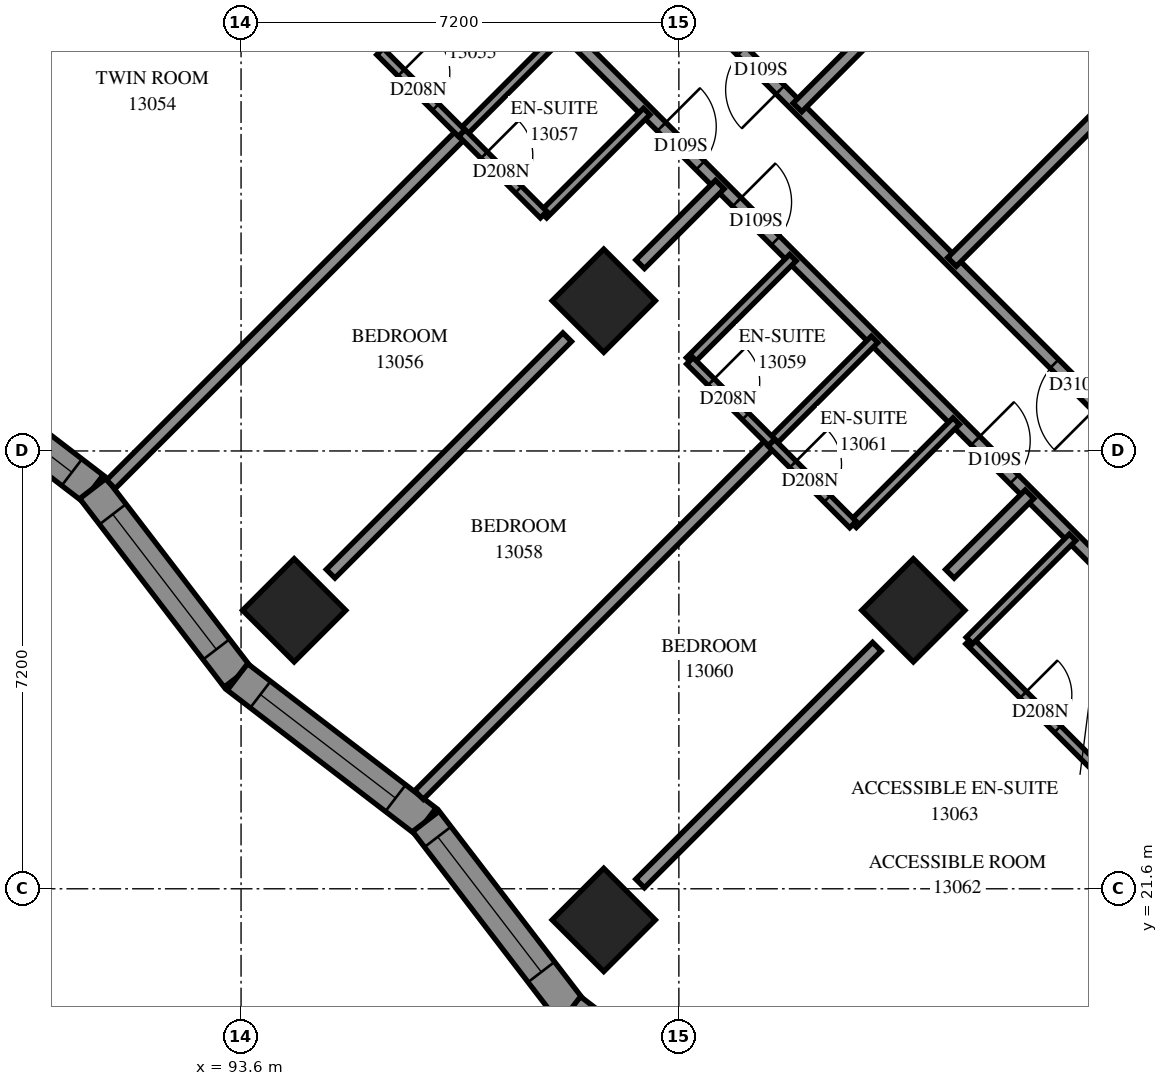
"""IFC4 building model, lengths in metres.
Left out: names, types, materials, properties, quantities, classifications, styles, units other than length and angle.
Written with IfcOpenShell. Run it as: python <this file> out.ifc"""

import sys

from ifc_helpers import new_model, si_unit, direction, frame, frame_2d, origin, origin_2d, place, context, subcontext, project, spatial, polyline, rectangle, outline, extrude, element, fill, save


model = new_model("IFC4")
c1 = context("Model", 3, precision=1e-05, world=origin(), true_north=direction((0.0, 1.0)))
c2 = subcontext(c1, "Body", "Model", "MODEL_VIEW")
j1 = project(units=[si_unit("LENGTHUNIT", "METRE"), si_unit("PLANEANGLEUNIT", "RADIAN")], contexts=[c1])
p1 = place(None, origin())
s1 = spatial("IfcSite", under=j1, at=p1, CompositionType="ELEMENT")
p2 = place(p1, origin())
s2 = spatial("IfcBuilding", under=s1, at=p2, CompositionType="ELEMENT")
p3 = place(p2, frame((0.0, 0.0, 50.8)))
s3 = spatial("IfcBuildingStorey", under=s2, at=p3, CompositionType="ELEMENT", Elevation=50.8)
for number, where, z_axis, x_axis in (
    (1, (99.565, 31.271, 0.0), (0.0, 0.0, 1.0), (0.707, -0.707, 0.0)),
    (2, (94.474, 26.18, 0.0), (0.0, 0.0, 1.0), (0.707, -0.707, 0.0)),
    (3, (104.656, 26.18, 0.0), (0.0, 0.0, 1.0), (0.707, -0.707, 0.0)),
    (4, (99.565, 21.088, 0.0), (0.0, 0.0, 1.0), (0.707, -0.707, 0.0)),
):
    element("IfcColumn", number, at=place(p3, frame(where, z_axis=z_axis, x_axis=x_axis)), inside=s3, PredefinedType="COLUMN", context=c2, shape_type="SweptSolid", body=[
        extrude(rectangle(XDim=1.2, YDim=1.2, at=origin_2d()), origin(), (0.0, 0.0, 1.0), 3.1),
    ])
p4 = place(p3, frame((88.065, 30.559, 0.0), z_axis=(0.0, 0.0, 1.0), x_axis=(0.7937184601, -0.6082852999, 0.0)))
e5 = element("IfcWall", 5, at=p4, inside=s3, PredefinedType="SOLIDWALL", context=c2, shape_type="SweptSolid", body=[
    extrude(outline(polyline([(-0.036, -0.275), (3.869, -0.275), (3.941, 0.275), (0.036, 0.275), (-0.036, -0.275)])), origin(), (0.0, 0.0, 1.0), 3.1),
])
p5 = place(p4, frame((0.668, 0.0, 0.5)))
e6 = element("IfcOpeningElement", 6, at=p5, cuts=e5, PredefinedType="OPENING", context=c2, shape_type="SweptSolid", body=[
    extrude(rectangle(XDim=2.8, YDim=2.45, at=frame_2d((1.4, 1.225))), frame((0.0, 0.285, 0.0), z_axis=(0.0, -1.0, 0.0), x_axis=(1.0, 0.0, 0.0)), (0.0, 0.0, 1.0), 0.57),
])
p6 = place(p3, frame((91.165, 28.183, 0.0), z_axis=(0.0, 0.0, 1.0), x_axis=(0.6082890689, -0.7937155717, 0.0)))
e7 = element("IfcWall", 7, at=p6, inside=s3, PredefinedType="SOLIDWALL", context=c2, shape_type="SweptSolid", body=[
    extrude(outline(polyline([(0.036, -0.275), (3.941, -0.275), (3.869, 0.275), (-0.036, 0.275), (0.036, -0.275)])), origin(), (0.0, 0.0, 1.0), 3.1),
])
p7 = place(p6, frame((0.534, 0.0, 0.5)))
e8 = element("IfcOpeningElement", 8, at=p7, cuts=e7, PredefinedType="OPENING", context=c2, shape_type="SweptSolid", body=[
    extrude(rectangle(XDim=2.8, YDim=2.45, at=frame_2d((1.4, 1.225))), frame((0.0, 0.285, 0.0), z_axis=(0.0, -1.0, 0.0), x_axis=(1.0, 0.0, 0.0)), (0.0, 0.0, 1.0), 0.57),
])
p8 = place(p3, frame((93.54, 25.084, 0.0), z_axis=(0.0, 0.0, 1.0), x_axis=(0.7937155717, -0.6082890689, 0.0)))
e9 = element("IfcWall", 9, at=p8, inside=s3, PredefinedType="SOLIDWALL", context=c2, shape_type="SweptSolid", body=[
    extrude(outline(polyline([(-0.036, -0.275), (3.869, -0.275), (3.941, 0.275), (0.036, 0.275), (-0.036, -0.275)])), origin(), (0.0, 0.0, 1.0), 3.1),
])
p9 = place(p8, frame((0.476, 0.0, 0.5)))
e10 = element("IfcOpeningElement", 10, at=p9, cuts=e9, PredefinedType="OPENING", context=c2, shape_type="SweptSolid", body=[
    extrude(rectangle(XDim=2.8, YDim=2.45, at=frame_2d((1.4, 1.225))), frame((0.0, 0.285, 0.0), z_axis=(0.0, -1.0, 0.0), x_axis=(1.0, 0.0, 0.0)), (0.0, 0.0, 1.0), 0.57),
])
p10 = place(p3, frame((96.64, 22.709, 0.0), z_axis=(0.0, 0.0, 1.0), x_axis=(0.6083014327, -0.7937060961, 0.0)))
e11 = element("IfcWall", 11, at=p10, inside=s3, PredefinedType="SOLIDWALL", context=c2, shape_type="SweptSolid", body=[
    extrude(outline(polyline([(0.036, -0.275), (3.941, -0.275), (3.869, 0.275), (-0.036, 0.275), (0.036, -0.275)])), origin(), (0.0, 0.0, 1.0), 3.1),
])
p11 = place(p10, frame((0.321, 0.0, 0.5)))
e12 = element("IfcOpeningElement", 12, at=p11, cuts=e11, PredefinedType="OPENING", context=c2, shape_type="SweptSolid", body=[
    extrude(rectangle(XDim=2.8, YDim=2.45, at=frame_2d((1.4, 1.225))), frame((0.0, 0.285, 0.0), z_axis=(0.0, -1.0, 0.0), x_axis=(1.0, 0.0, 0.0)), (0.0, 0.0, 1.0), 0.57),
])
p12 = place(p3, frame((99.015, 19.609, 0.0), z_axis=(0.0, 0.0, 1.0), x_axis=(0.7937059715, -0.6083015953, 0.0)))
e13 = element("IfcWall", 13, at=p12, inside=s3, PredefinedType="SOLIDWALL", context=c2, shape_type="SweptSolid", body=[
    extrude(outline(polyline([(-0.036, -0.275), (3.869, -0.275), (3.983, 0.275), (0.036, 0.275), (-0.036, -0.275)])), origin(), (0.0, 0.0, 1.0), 3.1),
])
p13 = place(p12, frame((1.002, 0.0, 0.5)))
e14 = element("IfcOpeningElement", 14, at=p13, cuts=e13, PredefinedType="OPENING", context=c2, shape_type="SweptSolid", body=[
    extrude(rectangle(XDim=1.2, YDim=2.45, at=frame_2d((0.6, 1.225))), frame((0.0, 0.285, 0.0), z_axis=(0.0, -1.0, 0.0), x_axis=(1.0, 0.0, 0.0)), (0.0, 0.0, 1.0), 0.57),
])
p14 = place(p3, frame((93.481, 41.167, 0.0), z_axis=(0.0, 0.0, 1.0), x_axis=(0.7071067812, -0.7071067812, 0.0)))
e15 = element("IfcWall", 15, at=p14, inside=s3, PredefinedType="PARTITIONING", context=c2, shape_type="SweptSolid", body=[
    extrude(rectangle(XDim=25.699, YDim=0.2, at=frame_2d((12.85, 0.0))), origin(), (0.0, 0.0, 1.0), 3.1),
])
p15 = place(p14, frame((2.8, 0.0, 0.0)))
e16 = element("IfcOpeningElement", 16, at=p15, cuts=e15, PredefinedType="OPENING", context=c2, shape_type="SweptSolid", body=[
    extrude(rectangle(XDim=0.9, YDim=2.1, at=frame_2d((0.45, 1.05))), frame((0.0, 0.11, 0.0), z_axis=(0.0, -1.0, 0.0), x_axis=(1.0, 0.0, 0.0)), (0.0, 0.0, 1.0), 0.22),
])
p16 = place(p14, frame((9.948, 0.0, 0.0)))
e17 = element("IfcOpeningElement", 17, at=p16, cuts=e15, PredefinedType="OPENING", context=c2, shape_type="SweptSolid", body=[
    extrude(rectangle(XDim=0.9, YDim=2.1, at=frame_2d((0.45, 1.05))), frame((0.0, 0.11, 0.0), z_axis=(0.0, -1.0, 0.0), x_axis=(1.0, 0.0, 0.0)), (0.0, 0.0, 1.0), 0.22),
])
p17 = place(p14, frame((11.7, 0.0, 0.0)))
e18 = element("IfcOpeningElement", 18, at=p17, cuts=e15, PredefinedType="OPENING", context=c2, shape_type="SweptSolid", body=[
    extrude(rectangle(XDim=0.9, YDim=2.1, at=frame_2d((0.45, 1.05))), frame((0.0, 0.11, 0.0), z_axis=(0.0, -1.0, 0.0), x_axis=(1.0, 0.0, 0.0)), (0.0, 0.0, 1.0), 0.22),
])
p18 = place(p14, frame((17.25, 0.0, 0.0)))
e19 = element("IfcOpeningElement", 19, at=p18, cuts=e15, PredefinedType="OPENING", context=c2, shape_type="SweptSolid", body=[
    extrude(rectangle(XDim=0.9, YDim=2.1, at=frame_2d((0.45, 1.05))), frame((0.0, 0.11, 0.0), z_axis=(0.0, -1.0, 0.0), x_axis=(1.0, 0.0, 0.0)), (0.0, 0.0, 1.0), 0.22),
])
p19 = place(p14, frame((22.82, 0.0, 0.0)))
e20 = element("IfcOpeningElement", 20, at=p19, cuts=e15, PredefinedType="OPENING", context=c2, shape_type="SweptSolid", body=[
    extrude(rectangle(XDim=0.9, YDim=2.1, at=frame_2d((0.45, 1.05))), frame((0.0, 0.11, 0.0), z_axis=(0.0, -1.0, 0.0), x_axis=(1.0, 0.0, 0.0)), (0.0, 0.0, 1.0), 0.22),
])
p20 = place(p3, frame((111.352, 25.855, 0.0), z_axis=(0.0, 0.0, 1.0), x_axis=(-0.7070418597, 0.7071716967, 0.0)))
e21 = element("IfcWall", 21, at=p20, inside=s3, PredefinedType="PARTITIONING", context=c2, shape_type="SweptSolid", body=[
    extrude(rectangle(XDim=13.864, YDim=0.2, at=frame_2d((6.932, 0.0))), origin(), (0.0, 0.0, 1.0), 3.1),
])
p21 = place(p20, frame((12.564, 0.0, 0.0)))
e22 = element("IfcOpeningElement", 22, at=p21, cuts=e21, PredefinedType="OPENING", context=c2, shape_type="SweptSolid", body=[
    extrude(rectangle(XDim=0.9, YDim=2.1, at=frame_2d((0.45, 1.05))), frame((0.0, 0.11, 0.0), z_axis=(0.0, -1.0, 0.0), x_axis=(1.0, 0.0, 0.0)), (0.0, 0.0, 1.0), 0.22),
])
p22 = place(p20, frame((5.19, 0.0, 0.0)))
e23 = element("IfcOpeningElement", 23, at=p22, cuts=e21, PredefinedType="OPENING", context=c2, shape_type="SweptSolid", body=[
    extrude(rectangle(XDim=1.0, YDim=2.1, at=frame_2d((0.5, 1.05))), frame((0.0, 0.11, 0.0), z_axis=(0.0, -1.0, 0.0), x_axis=(1.0, 0.0, 0.0)), (0.0, 0.0, 1.0), 0.22),
])
p23 = place(p3, frame((105.292, 31.908, 0.0), z_axis=(0.0, 0.0, 1.0), x_axis=(0.7071022382, 0.7071113241, 0.0)))
e24 = element("IfcWall", 24, at=p23, inside=s3, PredefinedType="PARTITIONING", context=c2, shape_type="SweptSolid", body=[
    extrude(rectangle(XDim=11.006, YDim=0.2, at=frame_2d((5.503, 0.0))), origin(), (0.0, 0.0, 1.0), 3.1),
])
p24 = place(p3, frame((86.314, 33.295, 0.0), z_axis=(0.0, 0.0, 1.0), x_axis=(0.7071020809, 0.7071114814, 0.0)))
e25 = element("IfcWall", 25, at=p24, inside=s3, PredefinedType="PARTITIONING", context=c2, shape_type="SweptSolid", body=[
    extrude(rectangle(XDim=10.638, YDim=0.2, at=frame_2d((5.319, 0.0))), origin(), (0.0, 0.0, 1.0), 3.1),
])
p25 = place(p3, frame((86.836, 34.524, 0.0), z_axis=(0.0, 0.0, 1.0), x_axis=(0.7071067812, 0.7071067812, 0.0)))
e26 = element("IfcWall", 26, at=p25, inside=s3, PredefinedType="PARTITIONING", context=c2, shape_type="SweptSolid", body=[
    extrude(rectangle(XDim=9.399, YDim=0.2, at=frame_2d((4.699, 0.0))), origin(), (0.0, 0.0, 1.0), 3.1),
])
p26 = place(p3, frame((96.526, 23.142, 0.0), z_axis=(0.0, 0.0, 1.0), x_axis=(0.7071128801, 0.7071006822, 0.0)))
e27 = element("IfcWall", 27, at=p26, inside=s3, PredefinedType="PARTITIONING", context=c2, shape_type="SweptSolid", body=[
    extrude(rectangle(XDim=8.198, YDim=0.2, at=frame_2d((4.099, 0.0))), origin(), (0.0, 0.0, 1.0), 3.1),
])
p27 = place(p3, frame((91.459, 28.251, 0.0), z_axis=(0.0, 0.0, 1.0), x_axis=(0.7072230972, 0.706990446, 0.0)))
e28 = element("IfcWall", 28, at=p27, inside=s3, PredefinedType="PARTITIONING", context=c2, shape_type="SweptSolid", body=[
    extrude(rectangle(XDim=8.167, YDim=0.2, at=frame_2d((4.083, 0.0))), origin(), (0.0, 0.0, 1.0), 3.1),
])
p28 = place(p3, frame((100.162, 21.688, 0.0), z_axis=(0.0, 0.0, 1.0), x_axis=(0.7071067812, 0.7071067812, 0.0)))
e29 = element("IfcWall", 29, at=p28, inside=s3, PredefinedType="PARTITIONING", context=c2, shape_type="SweptSolid", body=[
    extrude(rectangle(XDim=5.507, YDim=0.2, at=frame_2d((2.753, 0.0))), origin(), (0.0, 0.0, 1.0), 3.1),
])
p29 = place(p3, frame((105.255, 16.599, 0.0), z_axis=(0.0, 0.0, 1.0), x_axis=(0.7071067812, 0.7071067812, 0.0)))
e30 = element("IfcWall", 30, at=p29, inside=s3, PredefinedType="PARTITIONING", context=c2, shape_type="SweptSolid", body=[
    extrude(rectangle(XDim=5.504, YDim=0.2, at=frame_2d((2.752, 0.0))), origin(), (0.0, 0.0, 1.0), 2.6),
])
p30 = place(p3, frame((95.073, 26.781, 0.0), z_axis=(0.0, 0.0, 1.0), x_axis=(0.7071067812, 0.7071067812, 0.0)))
e31 = element("IfcWall", 31, at=p30, inside=s3, PredefinedType="PARTITIONING", context=c2, shape_type="SweptSolid", body=[
    extrude(rectangle(XDim=5.501, YDim=0.2, at=frame_2d((2.751, 0.0))), origin(), (0.0, 0.0, 1.0), 3.1),
])
p31 = place(p3, frame((105.573, 25.681, 0.0), z_axis=(0.0, 0.0, 1.0), x_axis=(0.7071067812, -0.7071067812, 0.0)))
e32 = element("IfcWall", 32, at=p31, inside=s3, PredefinedType="PARTITIONING", context=c2, shape_type="SweptSolid", body=[
    extrude(rectangle(XDim=3.199, YDim=0.15, at=frame_2d((1.599, 0.0))), origin(), (0.0, 0.0, 1.0), 3.1),
])
p32 = place(p31, frame((1.258, 0.0, 0.0)))
e33 = element("IfcOpeningElement", 33, at=p32, cuts=e32, PredefinedType="OPENING", context=c2, shape_type="SweptSolid", body=[
    extrude(rectangle(XDim=0.8, YDim=2.1, at=frame_2d((0.4, 1.05))), frame((0.0, 0.085, 0.0), z_axis=(0.0, -1.0, 0.0), x_axis=(1.0, 0.0, 0.0)), (0.0, 0.0, 1.0), 0.17),
])
for number, where, z_axis, x_axis in (
    (34, (100.977, 30.281, 0.0), (0.0, 0.0, 1.0), (0.707, 0.707, 0.0)),
    (35, (98.573, 32.685, 0.0), (0.0, 0.0, 1.0), (0.707, 0.707, 0.0)),
):
    element("IfcWall", number, at=place(p3, frame(where, z_axis=z_axis, x_axis=x_axis)), inside=s3, PredefinedType="PARTITIONING", context=c2, shape_type="SweptSolid", body=[
        extrude(rectangle(XDim=2.401, YDim=0.15, at=frame_2d((1.201, 0.0))), origin(), (0.0, 0.0, 1.0), 3.1),
    ])
for number, where, z_axis, x_axis in (
    (36, (105.578, 25.682, 0.0), (0.0, 0.0, 1.0), (0.707, 0.708, 0.0)),
    (37, (97.234, 34.026, 0.0), (0.0, 0.0, 1.0), (0.707, 0.708, 0.0)),
):
    element("IfcWall", number, at=place(p3, frame(where, z_axis=z_axis, x_axis=x_axis)), inside=s3, PredefinedType="PARTITIONING", context=c2, shape_type="SweptSolid", body=[
        extrude(rectangle(XDim=2.4, YDim=0.15, at=frame_2d((1.2, 0.0))), origin(), (0.0, 0.0, 1.0), 3.1),
    ])
for number, where, z_axis, x_axis in (
    (38, (95.887, 35.373, 0.0), (0.0, 0.0, 1.0), (0.707, 0.707, 0.0)),
    (39, (102.323, 28.939, 0.0), (0.0, 0.0, 1.0), (0.707, 0.707, 0.0)),
    (40, (103.665, 27.595, 0.0), (0.0, 0.0, 1.0), (0.707, 0.707, 0.0)),
):
    element("IfcWall", number, at=place(p3, frame(where, z_axis=z_axis, x_axis=x_axis)), inside=s3, PredefinedType="PARTITIONING", context=c2, shape_type="SweptSolid", body=[
        extrude(rectangle(XDim=2.398, YDim=0.15, at=frame_2d((1.199, 0.0))), origin(), (0.0, 0.0, 1.0), 3.1),
    ])
p33 = place(p3, frame((95.885, 35.369, 0.0), z_axis=(0.0, 0.0, 1.0), x_axis=(0.7071067812, -0.7071067812, 0.0)))
e41 = element("IfcWall", 41, at=p33, inside=s3, PredefinedType="PARTITIONING", context=c2, shape_type="SweptSolid", body=[
    extrude(rectangle(XDim=1.901, YDim=0.15, at=frame_2d((0.95, 0.0))), origin(), (0.0, 0.0, 1.0), 3.1),
])
p34 = place(p33, frame((0.493, 0.0, 0.0)))
e42 = element("IfcOpeningElement", 42, at=p34, cuts=e41, PredefinedType="OPENING", context=c2, shape_type="SweptSolid", body=[
    extrude(rectangle(XDim=0.8, YDim=2.1, at=frame_2d((0.4, 1.05))), frame((0.0, 0.085, 0.0), z_axis=(0.0, -1.0, 0.0), x_axis=(1.0, 0.0, 0.0)), (0.0, 0.0, 1.0), 0.17),
])
p35 = place(p3, frame((100.981, 30.283, 0.0), z_axis=(0.0, 0.0, 1.0), x_axis=(0.7076330979, -0.7065800724, 0.0)))
e43 = element("IfcWall", 43, at=p35, inside=s3, PredefinedType="PARTITIONING", context=c2, shape_type="SweptSolid", body=[
    extrude(rectangle(XDim=1.899, YDim=0.15, at=frame_2d((0.95, 0.0))), origin(), (0.0, 0.0, 1.0), 3.1),
])
p36 = place(p35, frame((0.493, 0.0, 0.0)))
e44 = element("IfcOpeningElement", 44, at=p36, cuts=e43, PredefinedType="OPENING", context=c2, shape_type="SweptSolid", body=[
    extrude(rectangle(XDim=0.8, YDim=2.1, at=frame_2d((0.4, 1.05))), frame((0.0, 0.085, 0.0), z_axis=(0.0, -1.0, 0.0), x_axis=(1.0, 0.0, 0.0)), (0.0, 0.0, 1.0), 0.17),
])
p37 = place(p3, frame((97.233, 34.029, 0.0), z_axis=(0.0, 0.0, 1.0), x_axis=(0.7065800724, -0.7076330979, 0.0)))
e45 = element("IfcWall", 45, at=p37, inside=s3, PredefinedType="PARTITIONING", context=c2, shape_type="SweptSolid", body=[
    extrude(rectangle(XDim=1.899, YDim=0.15, at=frame_2d((0.95, 0.0))), origin(), (0.0, 0.0, 1.0), 3.1),
])
p38 = place(p37, frame((0.515, 0.0, 0.0)))
e46 = element("IfcOpeningElement", 46, at=p38, cuts=e45, PredefinedType="OPENING", context=c2, shape_type="SweptSolid", body=[
    extrude(rectangle(XDim=0.8, YDim=2.1, at=frame_2d((0.4, 1.05))), frame((0.0, 0.085, 0.0), z_axis=(0.0, -1.0, 0.0), x_axis=(1.0, 0.0, 0.0)), (0.0, 0.0, 1.0), 0.17),
])
p39 = place(p3, frame((102.321, 28.935, 0.0), z_axis=(0.0, 0.0, 1.0), x_axis=(0.7065800724, -0.7076330979, 0.0)))
e47 = element("IfcWall", 47, at=p39, inside=s3, PredefinedType="PARTITIONING", context=c2, shape_type="SweptSolid", body=[
    extrude(rectangle(XDim=1.899, YDim=0.15, at=frame_2d((0.95, 0.0))), origin(), (0.0, 0.0, 1.0), 3.1),
])
p40 = place(p39, frame((0.501, 0.0, 0.0)))
e48 = element("IfcOpeningElement", 48, at=p40, cuts=e47, PredefinedType="OPENING", context=c2, shape_type="SweptSolid", body=[
    extrude(rectangle(XDim=0.8, YDim=2.1, at=frame_2d((0.4, 1.05))), frame((0.0, 0.085, 0.0), z_axis=(0.0, -1.0, 0.0), x_axis=(1.0, 0.0, 0.0)), (0.0, 0.0, 1.0), 0.17),
])
p41 = place(p3, frame((100.163, 31.871, 0.0), z_axis=(0.0, 0.0, 1.0), x_axis=(0.7071067812, 0.7071067812, 0.0)))
e49 = element("IfcWall", 49, at=p41, inside=s3, PredefinedType="PARTITIONING", context=c2, shape_type="SweptSolid", body=[
    extrude(rectangle(XDim=1.853, YDim=0.2, at=frame_2d((0.926, 0.0))), origin(), (0.0, 0.0, 1.0), 3.1),
])
for number, where, z_axis, x_axis in (
    (50, (105.256, 26.78, 0.0), (0.0, 0.0, 1.0), (0.708, 0.707, 0.0)),
    (51, (102.75, 34.45, 0.0), (0.0, 0.0, 1.0), (0.707, 0.708, 0.0)),
):
    element("IfcWall", number, at=place(p3, frame(where, z_axis=z_axis, x_axis=x_axis)), inside=s3, PredefinedType="PARTITIONING", context=c2, shape_type="SweptSolid", body=[
        extrude(rectangle(XDim=1.851, YDim=0.2, at=frame_2d((0.926, 0.0))), origin(), (0.0, 0.0, 1.0), 3.1),
    ])
p42 = place(p5, origin())
e52 = element("IfcWindow", 52, at=p42, inside=s3, PartitioningType="SINGLE_PANEL", PredefinedType="WINDOW", context=c2, shape_type="SweptSolid", body=[
    extrude(rectangle(XDim=2.8, YDim=2.45, at=frame_2d((1.4, 1.225))), frame((0.0, 0.155, 0.0), z_axis=(0.0, -1.0, 0.0), x_axis=(1.0, 0.0, 0.0)), (0.0, 0.0, 1.0), 0.06),
])
fill(e6, e52)
p43 = place(p7, origin())
e53 = element("IfcWindow", 53, at=p43, inside=s3, PartitioningType="SINGLE_PANEL", PredefinedType="WINDOW", context=c2, shape_type="SweptSolid", body=[
    extrude(rectangle(XDim=2.8, YDim=2.45, at=frame_2d((1.4, 1.225))), frame((0.0, 0.155, 0.0), z_axis=(0.0, -1.0, 0.0), x_axis=(1.0, 0.0, 0.0)), (0.0, 0.0, 1.0), 0.06),
])
fill(e8, e53)
p44 = place(p9, origin())
e54 = element("IfcWindow", 54, at=p44, inside=s3, PartitioningType="SINGLE_PANEL", PredefinedType="WINDOW", context=c2, shape_type="SweptSolid", body=[
    extrude(rectangle(XDim=2.8, YDim=2.45, at=frame_2d((1.4, 1.225))), frame((0.0, 0.155, 0.0), z_axis=(0.0, -1.0, 0.0), x_axis=(1.0, 0.0, 0.0)), (0.0, 0.0, 1.0), 0.06),
])
fill(e10, e54)
p45 = place(p11, origin())
e55 = element("IfcWindow", 55, at=p45, inside=s3, PartitioningType="SINGLE_PANEL", PredefinedType="WINDOW", context=c2, shape_type="SweptSolid", body=[
    extrude(rectangle(XDim=2.8, YDim=2.45, at=frame_2d((1.4, 1.225))), frame((0.0, 0.155, 0.0), z_axis=(0.0, -1.0, 0.0), x_axis=(1.0, 0.0, 0.0)), (0.0, 0.0, 1.0), 0.06),
])
fill(e12, e55)
p46 = place(p21, origin())
e56 = element("IfcDoor", 56, at=p46, inside=s3, OperationType="SINGLE_SWING_RIGHT", PredefinedType="DOOR", context=c2, shape_type="SweptSolid", body=[
    extrude(rectangle(XDim=0.9, YDim=2.1, at=frame_2d((0.45, 1.05))), frame((0.0, 0.025, 0.0), z_axis=(0.0, -1.0, 0.0), x_axis=(1.0, 0.0, 0.0)), (0.0, 0.0, 1.0), 0.05),
])
fill(e22, e56)
p47 = place(p22, origin())
e57 = element("IfcDoor", 57, at=p47, inside=s3, OperationType="SINGLE_SWING_RIGHT", PredefinedType="DOOR", context=c2, shape_type="SweptSolid", body=[
    extrude(rectangle(XDim=1.0, YDim=2.1, at=frame_2d((0.5, 1.05))), frame((0.0, 0.025, 0.0), z_axis=(0.0, -1.0, 0.0), x_axis=(1.0, 0.0, 0.0)), (0.0, 0.0, 1.0), 0.05),
])
fill(e23, e57)
p48 = place(p34, origin())
e58 = element("IfcDoor", 58, at=p48, inside=s3, OperationType="SINGLE_SWING_RIGHT", PredefinedType="DOOR", context=c2, shape_type="SweptSolid", body=[
    extrude(rectangle(XDim=0.8, YDim=2.1, at=frame_2d((0.4, 1.05))), frame((0.0, 0.025, 0.0), z_axis=(0.0, -1.0, 0.0), x_axis=(1.0, 0.0, 0.0)), (0.0, 0.0, 1.0), 0.05),
])
fill(e42, e58)
p49 = place(p16, origin())
e59 = element("IfcDoor", 59, at=p49, inside=s3, OperationType="SINGLE_SWING_LEFT", PredefinedType="DOOR", context=c2, shape_type="SweptSolid", body=[
    extrude(rectangle(XDim=0.9, YDim=2.1, at=frame_2d((0.45, 1.05))), frame((0.0, 0.025, 0.0), z_axis=(0.0, -1.0, 0.0), x_axis=(1.0, 0.0, 0.0)), (0.0, 0.0, 1.0), 0.05),
])
fill(e17, e59)
p50 = place(p38, origin())
e60 = element("IfcDoor", 60, at=p50, inside=s3, OperationType="SINGLE_SWING_RIGHT", PredefinedType="DOOR", context=c2, shape_type="SweptSolid", body=[
    extrude(rectangle(XDim=0.8, YDim=2.1, at=frame_2d((0.4, 1.05))), frame((0.0, 0.025, 0.0), z_axis=(0.0, -1.0, 0.0), x_axis=(1.0, 0.0, 0.0)), (0.0, 0.0, 1.0), 0.05),
])
fill(e46, e60)
p51 = place(p17, origin())
e61 = element("IfcDoor", 61, at=p51, inside=s3, OperationType="SINGLE_SWING_RIGHT", PredefinedType="DOOR", context=c2, shape_type="SweptSolid", body=[
    extrude(rectangle(XDim=0.9, YDim=2.1, at=frame_2d((0.45, 1.05))), frame((0.0, 0.025, 0.0), z_axis=(0.0, -1.0, 0.0), x_axis=(1.0, 0.0, 0.0)), (0.0, 0.0, 1.0), 0.05),
])
fill(e18, e61)
p52 = place(p36, origin())
e62 = element("IfcDoor", 62, at=p52, inside=s3, OperationType="SINGLE_SWING_RIGHT", PredefinedType="DOOR", context=c2, shape_type="SweptSolid", body=[
    extrude(rectangle(XDim=0.8, YDim=2.1, at=frame_2d((0.4, 1.05))), frame((0.0, 0.025, 0.0), z_axis=(0.0, -1.0, 0.0), x_axis=(1.0, 0.0, 0.0)), (0.0, 0.0, 1.0), 0.05),
])
fill(e44, e62)
p53 = place(p18, origin())
e63 = element("IfcDoor", 63, at=p53, inside=s3, OperationType="SINGLE_SWING_LEFT", PredefinedType="DOOR", context=c2, shape_type="SweptSolid", body=[
    extrude(rectangle(XDim=0.9, YDim=2.1, at=frame_2d((0.45, 1.05))), frame((0.0, 0.025, 0.0), z_axis=(0.0, -1.0, 0.0), x_axis=(1.0, 0.0, 0.0)), (0.0, 0.0, 1.0), 0.05),
])
fill(e19, e63)
p54 = place(p40, origin())
e64 = element("IfcDoor", 64, at=p54, inside=s3, OperationType="SINGLE_SWING_RIGHT", PredefinedType="DOOR", context=c2, shape_type="SweptSolid", body=[
    extrude(rectangle(XDim=0.8, YDim=2.1, at=frame_2d((0.4, 1.05))), frame((0.0, 0.025, 0.0), z_axis=(0.0, -1.0, 0.0), x_axis=(1.0, 0.0, 0.0)), (0.0, 0.0, 1.0), 0.05),
])
fill(e48, e64)
p55 = place(p32, origin())
e65 = element("IfcDoor", 65, at=p55, inside=s3, OperationType="SINGLE_SWING_RIGHT", PredefinedType="DOOR", context=c2, shape_type="SweptSolid", body=[
    extrude(rectangle(XDim=0.8, YDim=2.1, at=frame_2d((0.4, 1.05))), frame((0.0, 0.025, 0.0), z_axis=(0.0, -1.0, 0.0), x_axis=(1.0, 0.0, 0.0)), (0.0, 0.0, 1.0), 0.05),
])
fill(e33, e65)
save(model, sys.argv[1])
